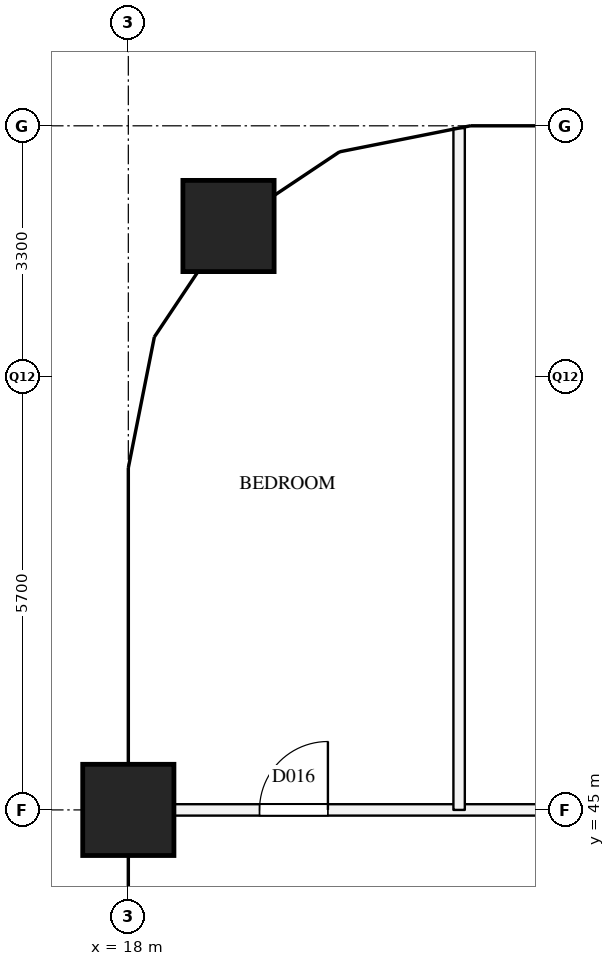
"""IFC4 building model, lengths in metres.
Left out: names, types, materials, properties, quantities, classifications, styles, units other than length and angle.
Written with IfcOpenShell. Run it as: python <this file> out.ifc"""

import sys

from ifc_helpers import new_model, si_unit, direction, frame, frame_2d, origin, origin_2d, place, context, subcontext, project, spatial, rectangle, extrude, element, fill, save


model = new_model("IFC4")
c1 = context("Model", 3, precision=1e-05, world=origin(), true_north=direction((0.0, 1.0)))
c2 = subcontext(c1, "Body", "Model", "MODEL_VIEW")
j1 = project(units=[si_unit("LENGTHUNIT", "METRE"), si_unit("PLANEANGLEUNIT", "RADIAN")], contexts=[c1])
p1 = place(None, origin())
s1 = spatial("IfcSite", under=j1, at=p1, CompositionType="ELEMENT")
p2 = place(p1, origin())
s2 = spatial("IfcBuilding", under=s1, at=p2, CompositionType="ELEMENT")
p3 = place(p2, frame((0.0, 0.0, 246.2)))
s3 = spatial("IfcBuildingStorey", under=s2, at=p3, CompositionType="ELEMENT", Elevation=246.2)
for number, where, z_axis, x_axis in (
    (1, (18.0, 45.0, 0.0), (0.0, 0.0, 1.0), (1.0, 0.0, 0.0)),
    (2, (19.318, 52.682, 0.0), (0.0, 0.0, 1.0), (1.0, 0.0, 0.0)),
):
    element("IfcColumn", number, at=place(p3, frame(where, z_axis=z_axis, x_axis=x_axis)), inside=s3, PredefinedType="COLUMN", context=c2, shape_type="SweptSolid", body=[
        extrude(rectangle(XDim=1.2, YDim=1.2, at=origin_2d()), origin(), (0.0, 0.0, 1.0), 3.9),
    ])
p4 = place(p3, frame((18.0, 45.0, 0.0), z_axis=(0.0, 0.0, 1.0), x_axis=(1.0, 0.0, 0.0)))
e3 = element("IfcWall", 3, at=p4, inside=s3, PredefinedType="PARTITIONING", context=c2, shape_type="SweptSolid", body=[
    extrude(rectangle(XDim=12.0, YDim=0.15, at=frame_2d((6.0, 0.0))), origin(), (0.0, 0.0, 1.0), 3.6),
])
p5 = place(p4, frame((10.123, 0.0, 0.0)))
e4 = element("IfcOpeningElement", 4, at=p5, cuts=e3, PredefinedType="OPENING", context=c2, shape_type="SweptSolid", body=[
    extrude(rectangle(XDim=0.9, YDim=2.1, at=frame_2d((0.45, 1.05))), frame((0.0, 0.085, 0.0), z_axis=(0.0, -1.0, 0.0), x_axis=(1.0, 0.0, 0.0)), (0.0, 0.0, 1.0), 0.17),
])
p6 = place(p4, frame((5.814, 0.0, 0.0)))
e5 = element("IfcOpeningElement", 5, at=p6, cuts=e3, PredefinedType="OPENING", context=c2, shape_type="SweptSolid", body=[
    extrude(rectangle(XDim=0.9, YDim=2.1, at=frame_2d((0.45, 1.05))), frame((0.0, 0.085, 0.0), z_axis=(0.0, -1.0, 0.0), x_axis=(1.0, 0.0, 0.0)), (0.0, 0.0, 1.0), 0.17),
])
p7 = place(p4, frame((1.726, 0.0, 0.0)))
e6 = element("IfcOpeningElement", 6, at=p7, cuts=e3, PredefinedType="OPENING", context=c2, shape_type="SweptSolid", body=[
    extrude(rectangle(XDim=0.9, YDim=2.1, at=frame_2d((0.45, 1.05))), frame((0.0, 0.085, 0.0), z_axis=(0.0, -1.0, 0.0), x_axis=(1.0, 0.0, 0.0)), (0.0, 0.0, 1.0), 0.17),
])
p8 = place(p3, frame((22.352, 45.0, 0.0), z_axis=(0.0, 0.0, 1.0), x_axis=(0.0, 1.0, 0.0)))
e7 = element("IfcWall", 7, at=p8, inside=s3, PredefinedType="PARTITIONING", context=c2, shape_type="SweptSolid", body=[
    extrude(rectangle(XDim=8.97, YDim=0.15, at=frame_2d((4.485, 0.0))), origin(), (0.0, 0.0, 1.0), 2.6),
])
p9 = place(p7, origin())
e8 = element("IfcDoor", 8, at=p9, inside=s3, OperationType="SINGLE_SWING_RIGHT", PredefinedType="DOOR", context=c2, shape_type="SweptSolid", body=[
    extrude(rectangle(XDim=0.9, YDim=2.1, at=frame_2d((0.45, 1.05))), frame((0.0, 0.025, 0.0), z_axis=(0.0, -1.0, 0.0), x_axis=(1.0, 0.0, 0.0)), (0.0, 0.0, 1.0), 0.05),
])
fill(e6, e8)
save(model, sys.argv[1])
